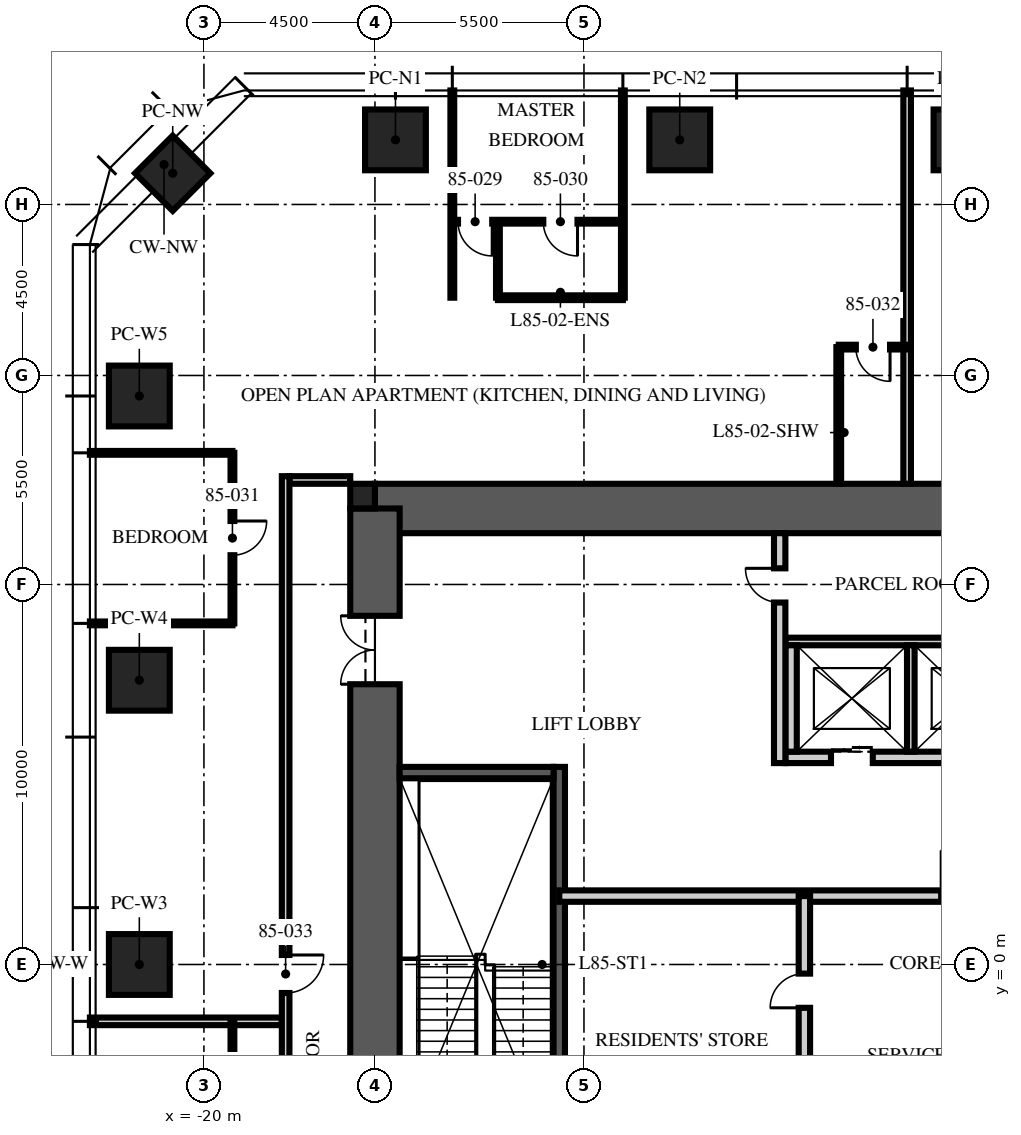
"""IFC4 building model, lengths in metres.
Left out: names, types, materials, properties, quantities, classifications, styles, units other than length and angle.
Written with IfcOpenShell. Run it as: python <this file> out.ifc"""

import sys

from ifc_helpers import new_model, si_unit, direction, frame, frame_2d, origin, origin_2d, place, context, subcontext, project, spatial, rectangle, extrude, element, fill, save


model = new_model("IFC4")
c1 = context("Model", 3, precision=1e-05, world=origin(), true_north=direction((0.0, 1.0)))
c2 = subcontext(c1, "Body", "Model", "MODEL_VIEW")
j1 = project(units=[si_unit("LENGTHUNIT", "METRE"), si_unit("PLANEANGLEUNIT", "RADIAN")], contexts=[c1])
p1 = place(None, origin())
s1 = spatial("IfcSite", under=j1, at=p1, CompositionType="ELEMENT")
p2 = place(p1, origin())
s2 = spatial("IfcBuilding", under=s1, at=p2, CompositionType="ELEMENT")
p3 = place(p2, frame((0.0, 0.0, 338.25)))
s3 = spatial("IfcBuildingStorey", under=s2, at=p3, CompositionType="ELEMENT", Elevation=338.25)
p4 = place(p3, frame((-15.5, 12.0, -0.25), z_axis=(0.0, 0.0, 1.0), x_axis=(1.0, 0.0, 0.0)))
e1 = element("IfcWall", 1, at=p4, inside=s3, PredefinedType="SHEAR", context=c2, shape_type="SweptSolid", body=[
    extrude(rectangle(XDim=31.0, YDim=1.3, at=frame_2d((15.5, 0.0))), origin(), (0.0, 0.0, 1.0), 3.75),
])
p5 = place(p3, frame((-15.5, -12.0, -0.25), z_axis=(0.0, 0.0, 1.0), x_axis=(0.0, 1.0, 0.0)))
e2 = element("IfcWall", 2, at=p5, inside=s3, PredefinedType="SHEAR", context=c2, shape_type="SweptSolid", body=[
    extrude(rectangle(XDim=24.0, YDim=1.3, at=frame_2d((12.0, 0.0))), origin(), (0.0, 0.0, 1.0), 3.75),
])
p6 = place(p5, frame((3.125, 0.0, 0.25)))
e3 = element("IfcOpeningElement", 3, at=p6, cuts=e2, PredefinedType="OPENING", context=c2, shape_type="SweptSolid", body=[
    extrude(rectangle(XDim=1.2, YDim=2.1, at=frame_2d((0.6, 1.05))), frame((0.0, 0.66, 0.0), z_axis=(0.0, -1.0, 0.0), x_axis=(1.0, 0.0, 0.0)), (0.0, 0.0, 1.0), 1.32),
])
p7 = place(p5, frame((19.375, 0.0, 0.25)))
e4 = element("IfcOpeningElement", 4, at=p7, cuts=e2, PredefinedType="OPENING", context=c2, shape_type="SweptSolid", body=[
    extrude(rectangle(XDim=1.8, YDim=2.1, at=frame_2d((0.9, 1.05))), frame((0.0, 0.66, 0.0), z_axis=(0.0, -1.0, 0.0), x_axis=(1.0, 0.0, 0.0)), (0.0, 0.0, 1.0), 1.32),
])
p8 = place(p3, frame((-15.825, 12.325, -0.25), z_axis=(0.0, 0.0, 1.0), x_axis=(1.0, 0.0, 0.0)))
e5 = element("IfcColumn", 5, at=p8, inside=s3, PredefinedType="COLUMN", context=c2, shape_type="SweptSolid", body=[
    extrude(rectangle(XDim=0.65, YDim=0.65, at=origin_2d()), origin(), (0.0, 0.0, 1.0), 3.75),
])
for number, where, z_axis, x_axis in (
    (6, (-14.96, 21.7, 0.0), (0.0, 0.0, 1.0), (1.0, 0.0, 0.0)),
    (7, (-7.48, 21.7, 0.0), (0.0, 0.0, 1.0), (1.0, 0.0, 0.0)),
    (8, (0.0, 21.7, 0.0), (0.0, 0.0, 1.0), (1.0, 0.0, 0.0)),
    (9, (-21.7, 0.0, 0.0), (0.0, 0.0, 1.0), (0.0, 1.0, 0.0)),
    (10, (-21.7, 7.48, 0.0), (0.0, 0.0, 1.0), (0.0, 1.0, 0.0)),
    (11, (-21.7, 14.96, 0.0), (0.0, 0.0, 1.0), (0.0, 1.0, 0.0)),
):
    element("IfcColumn", number, at=place(p3, frame(where, z_axis=z_axis, x_axis=x_axis)), inside=s3, PredefinedType="COLUMN", context=c2, shape_type="SweptSolid", body=[
        extrude(rectangle(XDim=1.6, YDim=1.6, at=origin_2d()), origin(), (0.0, 0.0, 1.0), 3.75),
    ])
p9 = place(p3, frame((-20.821, 20.821, 0.0), z_axis=(0.0, 0.0, 1.0), x_axis=(0.707106781187, 0.707106781187, 0.0)))
e12 = element("IfcColumn", 12, at=p9, inside=s3, PredefinedType="COLUMN", context=c2, shape_type="SweptSolid", body=[
    extrude(rectangle(XDim=1.4, YDim=1.4, at=origin_2d()), origin(), (0.0, 0.0, 1.0), 3.75),
])
p10 = place(p3, frame((-10.65, -4.9, 0.0), z_axis=(0.0, 0.0, 1.0), x_axis=(0.0, 1.0, 0.0)))
e13 = element("IfcWall", 13, at=p10, inside=s3, PredefinedType="SOLIDWALL", context=c2, shape_type="SweptSolid", body=[
    extrude(rectangle(XDim=10.1, YDim=0.3, at=frame_2d((5.05, 0.0))), origin(), (0.0, 0.0, 1.0), 3.5),
])
p11 = place(p3, frame((-14.85, 5.05, 0.0), z_axis=(0.0, 0.0, 1.0), x_axis=(1.0, 0.0, 0.0)))
e14 = element("IfcWall", 14, at=p11, inside=s3, PredefinedType="SOLIDWALL", context=c2, shape_type="SweptSolid", body=[
    extrude(rectangle(XDim=4.05, YDim=0.3, at=frame_2d((2.025, 0.0))), origin(), (0.0, 0.0, 1.0), 3.5),
])
p12 = place(p3, frame((-4.7, 5.45, 0.0), z_axis=(0.0, 0.0, 1.0), x_axis=(1.0, 0.0, 0.0)))
e15 = element("IfcWall", 15, at=p12, inside=s3, PredefinedType="PARTITIONING", context=c2, shape_type="SweptSolid", body=[
    extrude(rectangle(XDim=9.7, YDim=0.3, at=frame_2d((4.85, 0.0))), origin(), (0.0, 0.0, 1.0), 3.5),
])
p13 = place(p12, frame((1.2, 0.0, 0.0)))
e16 = element("IfcOpeningElement", 16, at=p13, cuts=e15, PredefinedType="OPENING", context=c2, shape_type="SweptSolid", body=[
    extrude(rectangle(XDim=1.1, YDim=2.1, at=frame_2d((0.55, 1.05))), frame((0.0, 0.16, 0.0), z_axis=(0.0, -1.0, 0.0), x_axis=(1.0, 0.0, 0.0)), (0.0, 0.0, 1.0), 0.32),
])
p14 = place(p12, frame((4.3, 0.0, 0.0)))
e17 = element("IfcOpeningElement", 17, at=p14, cuts=e15, PredefinedType="OPENING", context=c2, shape_type="SweptSolid", body=[
    extrude(rectangle(XDim=1.1, YDim=2.1, at=frame_2d((0.55, 1.05))), frame((0.0, 0.16, 0.0), z_axis=(0.0, -1.0, 0.0), x_axis=(1.0, 0.0, 0.0)), (0.0, 0.0, 1.0), 0.32),
])
p15 = place(p12, frame((7.4, 0.0, 0.0)))
e18 = element("IfcOpeningElement", 18, at=p15, cuts=e15, PredefinedType="OPENING", context=c2, shape_type="SweptSolid", body=[
    extrude(rectangle(XDim=1.1, YDim=2.1, at=frame_2d((0.55, 1.05))), frame((0.0, 0.16, 0.0), z_axis=(0.0, -1.0, 0.0), x_axis=(1.0, 0.0, 0.0)), (0.0, 0.0, 1.0), 0.32),
])
p16 = place(p3, frame((-4.7, 8.5, 0.0), z_axis=(0.0, 0.0, 1.0), x_axis=(1.0, 0.0, 0.0)))
e19 = element("IfcWall", 19, at=p16, inside=s3, PredefinedType="PARTITIONING", context=c2, shape_type="SweptSolid", body=[
    extrude(rectangle(XDim=9.7, YDim=0.2, at=frame_2d((4.85, 0.0))), origin(), (0.0, 0.0, 1.0), 3.5),
])
p17 = place(p3, frame((-4.55, 5.6, 0.0), z_axis=(0.0, 0.0, 1.0), x_axis=(0.0, 1.0, 0.0)))
e20 = element("IfcWall", 20, at=p17, inside=s3, PredefinedType="PARTITIONING", context=c2, shape_type="SweptSolid", body=[
    extrude(rectangle(XDim=2.8, YDim=0.3, at=frame_2d((1.4, 0.0))), origin(), (0.0, 0.0, 1.0), 3.5),
])
p18 = place(p3, frame((-1.4, 5.6, 0.0), z_axis=(0.0, 0.0, 1.0), x_axis=(0.0, 1.0, 0.0)))
e21 = element("IfcWall", 21, at=p18, inside=s3, PredefinedType="PARTITIONING", context=c2, shape_type="SweptSolid", body=[
    extrude(rectangle(XDim=2.8, YDim=0.2, at=frame_2d((1.4, 0.0))), origin(), (0.0, 0.0, 1.0), 3.5),
])
p19 = place(p3, frame((-10.65, 1.8, 0.0), z_axis=(0.0, 0.0, 1.0), x_axis=(1.0, 0.0, 0.0)))
e22 = element("IfcWall", 22, at=p19, inside=s3, PredefinedType="PARTITIONING", context=c2, shape_type="SweptSolid", body=[
    extrude(rectangle(XDim=21.3, YDim=0.3, at=frame_2d((10.65, 0.0))), origin(), (0.0, 0.0, 1.0), 3.5),
])
p20 = place(p19, frame((10.05, 0.0, 0.0)))
e23 = element("IfcOpeningElement", 23, at=p20, cuts=e22, PredefinedType="OPENING", context=c2, shape_type="SweptSolid", body=[
    extrude(rectangle(XDim=1.2, YDim=2.1, at=frame_2d((0.6, 1.05))), frame((0.0, 0.16, 0.0), z_axis=(0.0, -1.0, 0.0), x_axis=(1.0, 0.0, 0.0)), (0.0, 0.0, 1.0), 0.32),
])
p21 = place(p19, frame((19.238, 0.0, 0.0)))
e24 = element("IfcOpeningElement", 24, at=p21, cuts=e22, PredefinedType="OPENING", context=c2, shape_type="SweptSolid", body=[
    extrude(rectangle(XDim=0.9, YDim=2.1, at=frame_2d((0.45, 1.05))), frame((0.0, 0.16, 0.0), z_axis=(0.0, -1.0, 0.0), x_axis=(1.0, 0.0, 0.0)), (0.0, 0.0, 1.0), 0.32),
])
p22 = place(p3, frame((-4.2, -6.65, 0.0), z_axis=(0.0, 0.0, 1.0), x_axis=(0.0, 1.0, 0.0)))
e25 = element("IfcWall", 25, at=p22, inside=s3, PredefinedType="PARTITIONING", context=c2, shape_type="SweptSolid", body=[
    extrude(rectangle(XDim=8.45, YDim=0.3, at=frame_2d((4.225, 0.0))), origin(), (0.0, 0.0, 1.0), 3.5),
])
p23 = place(p22, frame((1.285, 0.0, 0.0)))
e26 = element("IfcOpeningElement", 26, at=p23, cuts=e25, PredefinedType="OPENING", context=c2, shape_type="SweptSolid", body=[
    extrude(rectangle(XDim=0.9, YDim=2.1, at=frame_2d((0.45, 1.05))), frame((0.0, 0.16, 0.0), z_axis=(0.0, -1.0, 0.0), x_axis=(1.0, 0.0, 0.0)), (0.0, 0.0, 1.0), 0.32),
])
p24 = place(p22, frame((5.51, 0.0, 0.0)))
e27 = element("IfcOpeningElement", 27, at=p24, cuts=e25, PredefinedType="OPENING", context=c2, shape_type="SweptSolid", body=[
    extrude(rectangle(XDim=0.9, YDim=2.1, at=frame_2d((0.45, 1.05))), frame((0.0, 0.16, 0.0), z_axis=(0.0, -1.0, 0.0), x_axis=(1.0, 0.0, 0.0)), (0.0, 0.0, 1.0), 0.32),
])
p25 = place(p3, frame((-4.85, 5.3, 0.0), z_axis=(0.0, 0.0, 1.0), x_axis=(0.0, 1.0, 0.0)))
e28 = element("IfcWall", 28, at=p25, inside=s3, PredefinedType="PARTITIONING", context=c2, shape_type="SweptSolid", body=[
    extrude(rectangle(XDim=6.05, YDim=0.3, at=frame_2d((3.025, 0.0))), origin(), (0.0, 0.0, 1.0), 3.5),
])
p26 = place(p25, frame((4.225, 0.0, 0.0)))
e29 = element("IfcOpeningElement", 29, at=p26, cuts=e28, PredefinedType="OPENING", context=c2, shape_type="SweptSolid", body=[
    extrude(rectangle(XDim=0.9, YDim=2.1, at=frame_2d((0.45, 1.05))), frame((0.0, 0.16, 0.0), z_axis=(0.0, -1.0, 0.0), x_axis=(1.0, 0.0, 0.0)), (0.0, 0.0, 1.0), 0.32),
])
p27 = place(p3, frame((-16.15, 12.75, 0.0), z_axis=(0.0, 0.0, 1.0), x_axis=(-1.0, 0.0, 0.0)))
e30 = element("IfcWall", 30, at=p27, inside=s3, PredefinedType="PARTITIONING", context=c2, shape_type="SweptSolid", body=[
    extrude(rectangle(XDim=1.6, YDim=0.2, at=frame_2d((0.8, 0.0))), origin(), (0.0, 0.0, 1.0), 2.6),
])
p28 = place(p3, frame((-1.496, 12.65, 0.0), z_axis=(0.0, 0.0, 1.0), x_axis=(0.0, 1.0, 0.0)))
e31 = element("IfcWall", 31, at=p28, inside=s3, PredefinedType="PARTITIONING", context=c2, shape_type="SweptSolid", body=[
    extrude(rectangle(XDim=10.35, YDim=0.2, at=frame_2d((5.175, 0.0))), origin(), (0.0, 0.0, 1.0), 3.01),
])
for number, where, z_axis, x_axis in (
    (32, (-8.976, 17.546, 0.0), (0.0, 0.0, 1.0), (0.0, 1.0, 0.0)),
    (33, (-13.464, 17.546, 0.0), (0.0, 0.0, 1.0), (0.0, 1.0, 0.0)),
):
    element("IfcWall", number, at=place(p3, frame(where, z_axis=z_axis, x_axis=x_axis)), inside=s3, PredefinedType="PARTITIONING", context=c2, shape_type="SweptSolid", body=[
        extrude(rectangle(XDim=5.454, YDim=0.1, at=frame_2d((2.727, 0.0))), origin(), (0.0, 0.0, 1.0), 3.01),
    ])
for number, where, z_axis, x_axis in (
    (34, (-19.25, 13.464, 0.0), (0.0, 0.0, 1.0), (-1.0, 0.0, 0.0)),
    (35, (-19.25, 8.976, 0.0), (0.0, 0.0, 1.0), (-1.0, 0.0, 0.0)),
):
    element("IfcWall", number, at=place(p3, frame(where, z_axis=z_axis, x_axis=x_axis)), inside=s3, PredefinedType="PARTITIONING", context=c2, shape_type="SweptSolid", body=[
        extrude(rectangle(XDim=3.75, YDim=0.1, at=frame_2d((1.875, 0.0))), origin(), (0.0, 0.0, 1.0), 3.01),
    ])
p29 = place(p3, frame((-17.95, -1.496, 0.0), z_axis=(0.0, 0.0, 1.0), x_axis=(-1.0, 0.0, 0.0)))
e36 = element("IfcWall", 36, at=p29, inside=s3, PredefinedType="PARTITIONING", context=c2, shape_type="SweptSolid", body=[
    extrude(rectangle(XDim=5.05, YDim=0.2, at=frame_2d((2.525, 0.0))), origin(), (0.0, 0.0, 1.0), 3.01),
])
p30 = place(p3, frame((-8.976, 19.546, 0.0), z_axis=(0.0, 0.0, 1.0), x_axis=(-1.0, 0.0, 0.0)))
e37 = element("IfcWall", 37, at=p30, inside=s3, PredefinedType="PARTITIONING", context=c2, shape_type="SweptSolid", body=[
    extrude(rectangle(XDim=4.488, YDim=0.1, at=frame_2d((2.244, 0.0))), origin(), (0.0, 0.0, 1.0), 2.91),
])
p31 = place(p30, frame((3.438, 0.0, 0.0)))
e38 = element("IfcOpeningElement", 38, at=p31, cuts=e37, PredefinedType="OPENING", context=c2, shape_type="SweptSolid", body=[
    extrude(rectangle(XDim=0.9, YDim=2.1, at=frame_2d((0.45, 1.05))), frame((0.0, 0.06, 0.0), z_axis=(0.0, -1.0, 0.0), x_axis=(1.0, 0.0, 0.0)), (0.0, 0.0, 1.0), 0.12),
])
p32 = place(p30, frame((1.194, 0.0, 0.0)))
e39 = element("IfcOpeningElement", 39, at=p32, cuts=e37, PredefinedType="OPENING", context=c2, shape_type="SweptSolid", body=[
    extrude(rectangle(XDim=0.9, YDim=2.1, at=frame_2d((0.45, 1.05))), frame((0.0, 0.06, 0.0), z_axis=(0.0, -1.0, 0.0), x_axis=(1.0, 0.0, 0.0)), (0.0, 0.0, 1.0), 0.12),
])
p33 = place(p3, frame((-12.264, 17.546, 0.0), z_axis=(0.0, 0.0, 1.0), x_axis=(0.0, 1.0, 0.0)))
e40 = element("IfcWall", 40, at=p33, inside=s3, PredefinedType="PARTITIONING", context=c2, shape_type="SweptSolid", body=[
    extrude(rectangle(XDim=2.0, YDim=0.1, at=frame_2d((1.0, 0.0))), origin(), (0.0, 0.0, 1.0), 3.5),
])
p34 = place(p3, frame((-8.976, 17.546, 0.0), z_axis=(0.0, 0.0, 1.0), x_axis=(-1.0, 0.0, 0.0)))
e41 = element("IfcWall", 41, at=p34, inside=s3, PredefinedType="PARTITIONING", context=c2, shape_type="SweptSolid", body=[
    extrude(rectangle(XDim=3.288, YDim=0.125, at=frame_2d((1.644, 0.0))), origin(), (0.0, 0.0, 1.0), 2.91),
])
p35 = place(p3, frame((-19.25, 13.464, 0.0), z_axis=(0.0, 0.0, 1.0), x_axis=(0.0, -1.0, 0.0)))
e42 = element("IfcWall", 42, at=p35, inside=s3, PredefinedType="PARTITIONING", context=c2, shape_type="SweptSolid", body=[
    extrude(rectangle(XDim=4.488, YDim=0.1, at=frame_2d((2.244, 0.0))), origin(), (0.0, 0.0, 1.0), 2.91),
])
p36 = place(p35, frame((1.794, 0.0, 0.0)))
e43 = element("IfcOpeningElement", 43, at=p36, cuts=e42, PredefinedType="OPENING", context=c2, shape_type="SweptSolid", body=[
    extrude(rectangle(XDim=0.9, YDim=2.1, at=frame_2d((0.45, 1.05))), frame((0.0, 0.06, 0.0), z_axis=(0.0, -1.0, 0.0), x_axis=(1.0, 0.0, 0.0)), (0.0, 0.0, 1.0), 0.12),
])
p37 = place(p3, frame((-1.496, 16.246, 0.0), z_axis=(0.0, 0.0, 1.0), x_axis=(-1.0, 0.0, 0.0)))
e44 = element("IfcWall", 44, at=p37, inside=s3, PredefinedType="PARTITIONING", context=c2, shape_type="SweptSolid", body=[
    extrude(rectangle(XDim=1.8, YDim=0.125, at=frame_2d((0.9, 0.0))), origin(), (0.0, 0.0, 1.0), 3.5),
])
p38 = place(p37, frame((0.45, 0.0, 0.0)))
e45 = element("IfcOpeningElement", 45, at=p38, cuts=e44, PredefinedType="OPENING", context=c2, shape_type="SweptSolid", body=[
    extrude(rectangle(XDim=0.9, YDim=2.1, at=frame_2d((0.45, 1.05))), frame((0.0, 0.073, 0.0), z_axis=(0.0, -1.0, 0.0), x_axis=(1.0, 0.0, 0.0)), (0.0, 0.0, 1.0), 0.145),
])
p39 = place(p3, frame((-3.296, 12.65, 0.0), z_axis=(0.0, 0.0, 1.0), x_axis=(0.0, 1.0, 0.0)))
e46 = element("IfcWall", 46, at=p39, inside=s3, PredefinedType="PARTITIONING", context=c2, shape_type="SweptSolid", body=[
    extrude(rectangle(XDim=3.596, YDim=0.125, at=frame_2d((1.798, 0.0))), origin(), (0.0, 0.0, 1.0), 3.5),
])
p40 = place(p3, frame((-19.25, -1.496, 0.0), z_axis=(0.0, 0.0, 1.0), x_axis=(0.0, -1.0, 0.0)))
e47 = element("IfcWall", 47, at=p40, inside=s3, PredefinedType="PARTITIONING", context=c2, shape_type="SweptSolid", body=[
    extrude(rectangle(XDim=4.488, YDim=0.1, at=frame_2d((2.244, 0.0))), origin(), (0.0, 0.0, 1.0), 2.91),
])
p41 = place(p40, frame((1.794, 0.0, 0.0)))
e48 = element("IfcOpeningElement", 48, at=p41, cuts=e47, PredefinedType="OPENING", context=c2, shape_type="SweptSolid", body=[
    extrude(rectangle(XDim=0.9, YDim=2.1, at=frame_2d((0.45, 1.05))), frame((0.0, 0.06, 0.0), z_axis=(0.0, -1.0, 0.0), x_axis=(1.0, 0.0, 0.0)), (0.0, 0.0, 1.0), 0.12),
])
p42 = place(p3, frame((-17.85, 12.85, 0.0), z_axis=(0.0, 0.0, 1.0), x_axis=(0.0, -1.0, 0.0)))
e49 = element("IfcWall", 49, at=p42, inside=s3, PredefinedType="PARTITIONING", context=c2, shape_type="SweptSolid", body=[
    extrude(rectangle(XDim=25.5, YDim=0.2, at=frame_2d((12.75, 0.0))), origin(), (0.0, 0.0, 1.0), 2.9),
])
p43 = place(p42, frame((12.6, 0.0, 0.0)))
e50 = element("IfcOpeningElement", 50, at=p43, cuts=e49, PredefinedType="OPENING", context=c2, shape_type="SweptSolid", body=[
    extrude(rectangle(XDim=1.0, YDim=2.2, at=frame_2d((0.5, 1.1))), frame((0.0, 0.11, 0.0), z_axis=(0.0, -1.0, 0.0), x_axis=(1.0, 0.0, 0.0)), (0.0, 0.0, 1.0), 0.22),
])
p44 = place(p42, frame((23.366, 0.0, 0.0)))
e51 = element("IfcOpeningElement", 51, at=p44, cuts=e49, PredefinedType="OPENING", context=c2, shape_type="SweptSolid", body=[
    extrude(rectangle(XDim=1.0, YDim=2.2, at=frame_2d((0.5, 1.1))), frame((0.0, 0.11, 0.0), z_axis=(0.0, -1.0, 0.0), x_axis=(1.0, 0.0, 0.0)), (0.0, 0.0, 1.0), 0.22),
])
p45 = place(p7, origin())
e52 = element("IfcDoor", 52, at=p45, inside=s3, OperationType="DOUBLE_DOOR_SINGLE_SWING", PredefinedType="DOOR", context=c2, shape_type="SweptSolid", body=[
    extrude(rectangle(XDim=1.8, YDim=2.1, at=frame_2d((0.9, 1.05))), frame((0.0, 0.025, 0.0), z_axis=(0.0, -1.0, 0.0), x_axis=(1.0, 0.0, 0.0)), (0.0, 0.0, 1.0), 0.05),
])
fill(e4, e52)
p46 = place(p13, origin())
e53 = element("IfcDoor", 53, at=p46, inside=s3, OperationType="DOUBLE_DOOR_SLIDING", PredefinedType="DOOR", context=c2, shape_type="SweptSolid", body=[
    extrude(rectangle(XDim=1.1, YDim=2.1, at=frame_2d((0.55, 1.05))), frame((0.0, 0.025, 0.0), z_axis=(0.0, -1.0, 0.0), x_axis=(1.0, 0.0, 0.0)), (0.0, 0.0, 1.0), 0.05),
])
fill(e16, e53)
p47 = place(p20, origin())
e54 = element("IfcDoor", 54, at=p47, inside=s3, OperationType="SINGLE_SWING_LEFT", PredefinedType="DOOR", context=c2, shape_type="SweptSolid", body=[
    extrude(rectangle(XDim=1.2, YDim=2.1, at=frame_2d((0.6, 1.05))), frame((0.0, 0.025, 0.0), z_axis=(0.0, -1.0, 0.0), x_axis=(1.0, 0.0, 0.0)), (0.0, 0.0, 1.0), 0.05),
])
fill(e23, e54)
p48 = place(p24, origin())
e55 = element("IfcDoor", 55, at=p48, inside=s3, OperationType="SINGLE_SWING_LEFT", PredefinedType="DOOR", context=c2, shape_type="SweptSolid", body=[
    extrude(rectangle(XDim=0.9, YDim=2.1, at=frame_2d((0.45, 1.05))), frame((0.0, 0.025, 0.0), z_axis=(0.0, -1.0, 0.0), x_axis=(1.0, 0.0, 0.0)), (0.0, 0.0, 1.0), 0.05),
])
fill(e27, e55)
p49 = place(p26, origin())
e56 = element("IfcDoor", 56, at=p49, inside=s3, OperationType="SINGLE_SWING_RIGHT", PredefinedType="DOOR", context=c2, shape_type="SweptSolid", body=[
    extrude(rectangle(XDim=0.9, YDim=2.1, at=frame_2d((0.45, 1.05))), frame((0.0, 0.025, 0.0), z_axis=(0.0, -1.0, 0.0), x_axis=(1.0, 0.0, 0.0)), (0.0, 0.0, 1.0), 0.05),
])
fill(e29, e56)
p50 = place(p31, origin())
e57 = element("IfcDoor", 57, at=p50, inside=s3, OperationType="SINGLE_SWING_LEFT", PredefinedType="DOOR", context=c2, shape_type="SweptSolid", body=[
    extrude(rectangle(XDim=0.9, YDim=2.1, at=frame_2d((0.45, 1.05))), frame((0.0, 0.025, 0.0), z_axis=(0.0, -1.0, 0.0), x_axis=(1.0, 0.0, 0.0)), (0.0, 0.0, 1.0), 0.05),
])
fill(e38, e57)
p51 = place(p32, origin())
e58 = element("IfcDoor", 58, at=p51, inside=s3, OperationType="SINGLE_SWING_LEFT", PredefinedType="DOOR", context=c2, shape_type="SweptSolid", body=[
    extrude(rectangle(XDim=0.9, YDim=2.1, at=frame_2d((0.45, 1.05))), frame((0.0, 0.025, 0.0), z_axis=(0.0, -1.0, 0.0), x_axis=(1.0, 0.0, 0.0)), (0.0, 0.0, 1.0), 0.05),
])
fill(e39, e58)
p52 = place(p36, origin())
e59 = element("IfcDoor", 59, at=p52, inside=s3, OperationType="SINGLE_SWING_LEFT", PredefinedType="DOOR", context=c2, shape_type="SweptSolid", body=[
    extrude(rectangle(XDim=0.9, YDim=2.1, at=frame_2d((0.45, 1.05))), frame((0.0, 0.025, 0.0), z_axis=(0.0, -1.0, 0.0), x_axis=(1.0, 0.0, 0.0)), (0.0, 0.0, 1.0), 0.05),
])
fill(e43, e59)
p53 = place(p38, origin())
e60 = element("IfcDoor", 60, at=p53, inside=s3, OperationType="SINGLE_SWING_LEFT", PredefinedType="DOOR", context=c2, shape_type="SweptSolid", body=[
    extrude(rectangle(XDim=0.9, YDim=2.1, at=frame_2d((0.45, 1.05))), frame((0.0, 0.025, 0.0), z_axis=(0.0, -1.0, 0.0), x_axis=(1.0, 0.0, 0.0)), (0.0, 0.0, 1.0), 0.05),
])
fill(e45, e60)
p54 = place(p43, origin())
e61 = element("IfcDoor", 61, at=p54, inside=s3, OperationType="SINGLE_SWING_LEFT", PredefinedType="DOOR", context=c2, shape_type="SweptSolid", body=[
    extrude(rectangle(XDim=1.0, YDim=2.2, at=frame_2d((0.5, 1.1))), frame((0.0, 0.025, 0.0), z_axis=(0.0, -1.0, 0.0), x_axis=(1.0, 0.0, 0.0)), (0.0, 0.0, 1.0), 0.05),
])
fill(e50, e61)
save(model, sys.argv[1])
